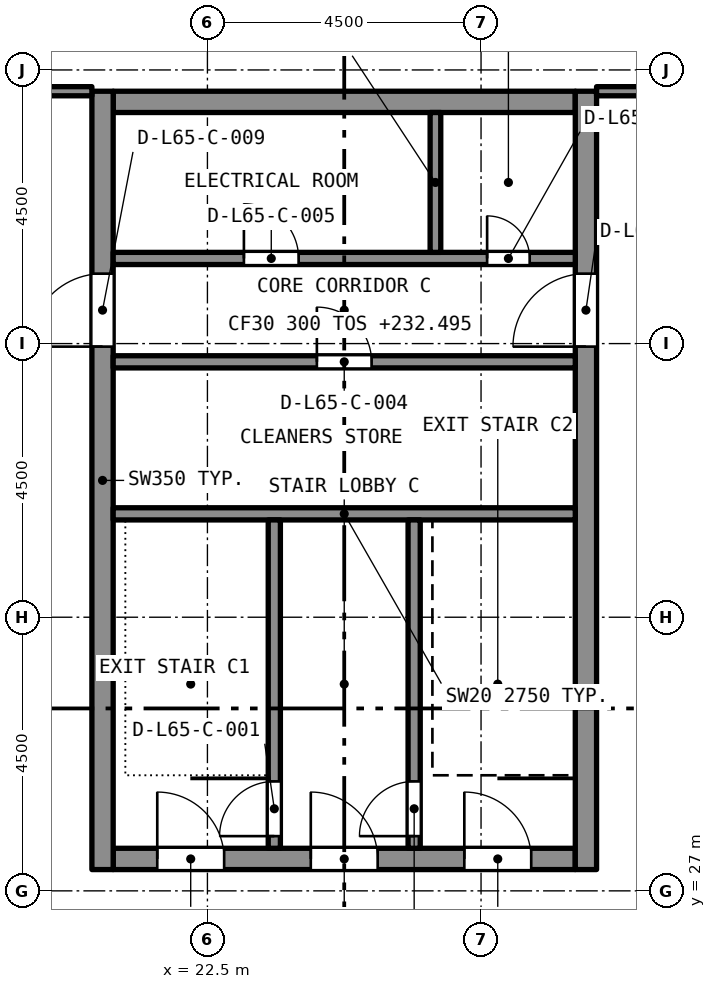
"""IFC4 building model, lengths in metres.
Left out: names, types, materials, properties, quantities, classifications, styles, units other than length and angle.
Written with IfcOpenShell. Run it as: python <this file> out.ifc"""

import sys

from ifc_helpers import new_model, si_unit, direction, frame, frame_2d, origin, place, context, subcontext, project, spatial, rectangle, extrude, element, fill, save


model = new_model("IFC4")
c1 = context("Model", 3, precision=1e-05, world=origin(), true_north=direction((0.0, 1.0)))
c2 = subcontext(c1, "Body", "Model", "MODEL_VIEW")
j1 = project(units=[si_unit("LENGTHUNIT", "METRE"), si_unit("PLANEANGLEUNIT", "RADIAN")], contexts=[c1])
p1 = place(None, origin())
s1 = spatial("IfcSite", under=j1, at=p1, CompositionType="ELEMENT")
p2 = place(p1, origin())
s2 = spatial("IfcBuilding", under=s1, at=p2, CompositionType="ELEMENT")
p3 = place(p2, frame((0.0, 0.0, 232.495)))
s3 = spatial("IfcBuildingStorey", under=s2, at=p3, CompositionType="ELEMENT", Elevation=232.495)
p4 = place(p3, frame((20.95, 27.525, 0.0), z_axis=(0.0, 0.0, 1.0), x_axis=(1.0, 0.0, 0.0)))
e1 = element("IfcWall", 1, at=p4, inside=s3, PredefinedType="SOLIDWALL", context=c2, shape_type="SweptSolid", body=[
    extrude(rectangle(XDim=7.6, YDim=0.35, at=frame_2d((3.8, 0.0))), origin(), (0.0, 0.0, 1.0), 3.2),
])
p5 = place(p4, frame((0.725, 0.0, 0.0)))
e2 = element("IfcOpeningElement", 2, at=p5, cuts=e1, PredefinedType="OPENING", context=c2, shape_type="SweptSolid", body=[
    extrude(rectangle(XDim=1.1, YDim=2.1, at=frame_2d((0.55, 1.05))), frame((0.0, 0.185, 0.0), z_axis=(0.0, -1.0, 0.0), x_axis=(1.0, 0.0, 0.0)), (0.0, 0.0, 1.0), 0.37),
])
p6 = place(p4, frame((3.25, 0.0, 0.0)))
e3 = element("IfcOpeningElement", 3, at=p6, cuts=e1, PredefinedType="OPENING", context=c2, shape_type="SweptSolid", body=[
    extrude(rectangle(XDim=1.1, YDim=2.1, at=frame_2d((0.55, 1.05))), frame((0.0, 0.185, 0.0), z_axis=(0.0, -1.0, 0.0), x_axis=(1.0, 0.0, 0.0)), (0.0, 0.0, 1.0), 0.37),
])
p7 = place(p4, frame((5.775, 0.0, 0.0)))
e4 = element("IfcOpeningElement", 4, at=p7, cuts=e1, PredefinedType="OPENING", context=c2, shape_type="SweptSolid", body=[
    extrude(rectangle(XDim=1.1, YDim=2.1, at=frame_2d((0.55, 1.05))), frame((0.0, 0.185, 0.0), z_axis=(0.0, -1.0, 0.0), x_axis=(1.0, 0.0, 0.0)), (0.0, 0.0, 1.0), 0.37),
])
p8 = place(p3, frame((20.95, 39.975, 0.0), z_axis=(0.0, 0.0, 1.0), x_axis=(1.0, 0.0, 0.0)))
e5 = element("IfcWall", 5, at=p8, inside=s3, PredefinedType="SOLIDWALL", context=c2, shape_type="SweptSolid", body=[
    extrude(rectangle(XDim=7.6, YDim=0.35, at=frame_2d((3.8, 0.0))), origin(), (0.0, 0.0, 1.0), 3.2),
])
p9 = place(p3, frame((20.775, 27.35, 0.0), z_axis=(0.0, 0.0, 1.0), x_axis=(0.0, 1.0, 0.0)))
e6 = element("IfcWall", 6, at=p9, inside=s3, PredefinedType="SOLIDWALL", context=c2, shape_type="SweptSolid", body=[
    extrude(rectangle(XDim=12.8, YDim=0.35, at=frame_2d((6.4, 0.0))), origin(), (0.0, 0.0, 1.0), 3.2),
])
p10 = place(p9, frame((8.6, 0.0, 0.0)))
e7 = element("IfcOpeningElement", 7, at=p10, cuts=e6, PredefinedType="OPENING", context=c2, shape_type="SweptSolid", body=[
    extrude(rectangle(XDim=1.2, YDim=2.1, at=frame_2d((0.6, 1.05))), frame((0.0, 0.185, 0.0), z_axis=(0.0, -1.0, 0.0), x_axis=(1.0, 0.0, 0.0)), (0.0, 0.0, 1.0), 0.37),
])
p11 = place(p3, frame((28.725, 27.35, 0.0), z_axis=(0.0, 0.0, 1.0), x_axis=(0.0, 1.0, 0.0)))
e8 = element("IfcWall", 8, at=p11, inside=s3, PredefinedType="SOLIDWALL", context=c2, shape_type="SweptSolid", body=[
    extrude(rectangle(XDim=12.8, YDim=0.35, at=frame_2d((6.4, 0.0))), origin(), (0.0, 0.0, 1.0), 3.2),
])
p12 = place(p11, frame((8.6, 0.0, 0.0)))
e9 = element("IfcOpeningElement", 9, at=p12, cuts=e8, PredefinedType="OPENING", context=c2, shape_type="SweptSolid", body=[
    extrude(rectangle(XDim=1.2, YDim=2.1, at=frame_2d((0.6, 1.05))), frame((0.0, 0.185, 0.0), z_axis=(0.0, -1.0, 0.0), x_axis=(1.0, 0.0, 0.0)), (0.0, 0.0, 1.0), 0.37),
])
p13 = place(p3, frame((18.4, 40.15, 0.0), z_axis=(0.0, 0.0, 1.0), x_axis=(1.0, 0.0, 0.0)))
e10 = element("IfcWall", 10, at=p13, inside=s3, PredefinedType="PARTITIONING", context=c2, shape_type="SweptSolid", body=[
    extrude(rectangle(XDim=2.2, YDim=0.15, at=frame_2d((1.1, 0.0))), origin(), (0.0, 0.0, 1.0), 2.75),
])
p14 = place(p13, frame((0.2, 0.0, 0.0)))
e11 = element("IfcOpeningElement", 11, at=p14, cuts=e10, PredefinedType="OPENING", context=c2, shape_type="SweptSolid", body=[
    extrude(rectangle(XDim=1.0, YDim=2.1, at=frame_2d((0.5, 1.05))), frame((0.0, 0.085, 0.0), z_axis=(0.0, -1.0, 0.0), x_axis=(1.0, 0.0, 0.0)), (0.0, 0.0, 1.0), 0.17),
])
p15 = place(p3, frame((28.9, 40.15, 0.0), z_axis=(0.0, 0.0, 1.0), x_axis=(1.0, 0.0, 0.0)))
e12 = element("IfcWall", 12, at=p15, inside=s3, PredefinedType="PARTITIONING", context=c2, shape_type="SweptSolid", body=[
    extrude(rectangle(XDim=2.2, YDim=0.15, at=frame_2d((1.1, 0.0))), origin(), (0.0, 0.0, 1.0), 2.75),
])
p16 = place(p3, frame((20.95, 33.2, 0.0), z_axis=(0.0, 0.0, 1.0), x_axis=(1.0, 0.0, 0.0)))
e13 = element("IfcWall", 13, at=p16, inside=s3, PredefinedType="SOLIDWALL", context=c2, shape_type="SweptSolid", body=[
    extrude(rectangle(XDim=7.6, YDim=0.2, at=frame_2d((3.8, 0.0))), origin(), (0.0, 0.0, 1.0), 2.75),
])
p17 = place(p3, frame((20.95, 35.7, 0.0), z_axis=(0.0, 0.0, 1.0), x_axis=(1.0, 0.0, 0.0)))
e14 = element("IfcWall", 14, at=p17, inside=s3, PredefinedType="SOLIDWALL", context=c2, shape_type="SweptSolid", body=[
    extrude(rectangle(XDim=7.6, YDim=0.2, at=frame_2d((3.8, 0.0))), origin(), (0.0, 0.0, 1.0), 2.75),
])
p18 = place(p17, frame((3.35, 0.0, 0.0)))
e15 = element("IfcOpeningElement", 15, at=p18, cuts=e14, PredefinedType="OPENING", context=c2, shape_type="SweptSolid", body=[
    extrude(rectangle(XDim=0.9, YDim=2.1, at=frame_2d((0.45, 1.05))), frame((0.0, 0.11, 0.0), z_axis=(0.0, -1.0, 0.0), x_axis=(1.0, 0.0, 0.0)), (0.0, 0.0, 1.0), 0.22),
])
p19 = place(p3, frame((20.95, 37.4, 0.0), z_axis=(0.0, 0.0, 1.0), x_axis=(1.0, 0.0, 0.0)))
e16 = element("IfcWall", 16, at=p19, inside=s3, PredefinedType="SOLIDWALL", context=c2, shape_type="SweptSolid", body=[
    extrude(rectangle(XDim=7.6, YDim=0.2, at=frame_2d((3.8, 0.0))), origin(), (0.0, 0.0, 1.0), 2.75),
])
p20 = place(p19, frame((6.15, 0.0, 0.0)))
e17 = element("IfcOpeningElement", 17, at=p20, cuts=e16, PredefinedType="OPENING", context=c2, shape_type="SweptSolid", body=[
    extrude(rectangle(XDim=0.7, YDim=2.1, at=frame_2d((0.35, 1.05))), frame((0.0, 0.11, 0.0), z_axis=(0.0, -1.0, 0.0), x_axis=(1.0, 0.0, 0.0)), (0.0, 0.0, 1.0), 0.22),
])
p21 = place(p19, frame((2.15, 0.0, 0.0)))
e18 = element("IfcOpeningElement", 18, at=p21, cuts=e16, PredefinedType="OPENING", context=c2, shape_type="SweptSolid", body=[
    extrude(rectangle(XDim=0.9, YDim=2.1, at=frame_2d((0.45, 1.05))), frame((0.0, 0.11, 0.0), z_axis=(0.0, -1.0, 0.0), x_axis=(1.0, 0.0, 0.0)), (0.0, 0.0, 1.0), 0.22),
])
p22 = place(p3, frame((23.6, 27.7, 0.0), z_axis=(0.0, 0.0, 1.0), x_axis=(0.0, 1.0, 0.0)))
e19 = element("IfcWall", 19, at=p22, inside=s3, PredefinedType="SOLIDWALL", context=c2, shape_type="SweptSolid", body=[
    extrude(rectangle(XDim=5.4, YDim=0.2, at=frame_2d((2.7, 0.0))), origin(), (0.0, 0.0, 1.0), 2.75),
])
p23 = place(p22, frame((0.2, 0.0, 0.0)))
e20 = element("IfcOpeningElement", 20, at=p23, cuts=e19, PredefinedType="OPENING", context=c2, shape_type="SweptSolid", body=[
    extrude(rectangle(XDim=0.9, YDim=2.1, at=frame_2d((0.45, 1.05))), frame((0.0, 0.11, 0.0), z_axis=(0.0, -1.0, 0.0), x_axis=(1.0, 0.0, 0.0)), (0.0, 0.0, 1.0), 0.22),
])
p24 = place(p3, frame((25.9, 27.7, 0.0), z_axis=(0.0, 0.0, 1.0), x_axis=(0.0, 1.0, 0.0)))
e21 = element("IfcWall", 21, at=p24, inside=s3, PredefinedType="SOLIDWALL", context=c2, shape_type="SweptSolid", body=[
    extrude(rectangle(XDim=5.4, YDim=0.2, at=frame_2d((2.7, 0.0))), origin(), (0.0, 0.0, 1.0), 2.75),
])
p25 = place(p24, frame((0.2, 0.0, 0.0)))
e22 = element("IfcOpeningElement", 22, at=p25, cuts=e21, PredefinedType="OPENING", context=c2, shape_type="SweptSolid", body=[
    extrude(rectangle(XDim=0.9, YDim=2.1, at=frame_2d((0.45, 1.05))), frame((0.0, 0.11, 0.0), z_axis=(0.0, -1.0, 0.0), x_axis=(1.0, 0.0, 0.0)), (0.0, 0.0, 1.0), 0.22),
])
p26 = place(p3, frame((26.25, 37.5, 0.0), z_axis=(0.0, 0.0, 1.0), x_axis=(0.0, 1.0, 0.0)))
e23 = element("IfcWall", 23, at=p26, inside=s3, PredefinedType="SOLIDWALL", context=c2, shape_type="SweptSolid", body=[
    extrude(rectangle(XDim=2.3, YDim=0.175, at=frame_2d((1.15, 0.0))), origin(), (0.0, 0.0, 1.0), 2.75),
])
p27 = place(p23, origin())
e24 = element("IfcDoor", 24, at=p27, inside=s3, OperationType="SINGLE_SWING_LEFT", PredefinedType="DOOR", context=c2, shape_type="SweptSolid", body=[
    extrude(rectangle(XDim=0.9, YDim=2.1, at=frame_2d((0.45, 1.05))), frame((0.0, 0.025, 0.0), z_axis=(0.0, -1.0, 0.0), x_axis=(1.0, 0.0, 0.0)), (0.0, 0.0, 1.0), 0.05),
])
fill(e20, e24)
p28 = place(p25, origin())
e25 = element("IfcDoor", 25, at=p28, inside=s3, OperationType="SINGLE_SWING_LEFT", PredefinedType="DOOR", context=c2, shape_type="SweptSolid", body=[
    extrude(rectangle(XDim=0.9, YDim=2.1, at=frame_2d((0.45, 1.05))), frame((0.0, 0.025, 0.0), z_axis=(0.0, -1.0, 0.0), x_axis=(1.0, 0.0, 0.0)), (0.0, 0.0, 1.0), 0.05),
])
fill(e22, e25)
p29 = place(p20, origin())
e26 = element("IfcDoor", 26, at=p29, inside=s3, OperationType="SINGLE_SWING_LEFT", PredefinedType="DOOR", context=c2, shape_type="SweptSolid", body=[
    extrude(rectangle(XDim=0.7, YDim=2.1, at=frame_2d((0.35, 1.05))), frame((0.0, 0.025, 0.0), z_axis=(0.0, -1.0, 0.0), x_axis=(1.0, 0.0, 0.0)), (0.0, 0.0, 1.0), 0.05),
])
fill(e17, e26)
p30 = place(p18, origin())
e27 = element("IfcDoor", 27, at=p30, inside=s3, OperationType="SINGLE_SWING_LEFT", PredefinedType="DOOR", context=c2, shape_type="SweptSolid", body=[
    extrude(rectangle(XDim=0.9, YDim=2.1, at=frame_2d((0.45, 1.05))), frame((0.0, 0.025, 0.0), z_axis=(0.0, -1.0, 0.0), x_axis=(1.0, 0.0, 0.0)), (0.0, 0.0, 1.0), 0.05),
])
fill(e15, e27)
p31 = place(p21, origin())
e28 = element("IfcDoor", 28, at=p31, inside=s3, OperationType="SINGLE_SWING_LEFT", PredefinedType="DOOR", context=c2, shape_type="SweptSolid", body=[
    extrude(rectangle(XDim=0.9, YDim=2.1, at=frame_2d((0.45, 1.05))), frame((0.0, 0.025, 0.0), z_axis=(0.0, -1.0, 0.0), x_axis=(1.0, 0.0, 0.0)), (0.0, 0.0, 1.0), 0.05),
])
fill(e18, e28)
p32 = place(p5, origin())
e29 = element("IfcDoor", 29, at=p32, inside=s3, OperationType="SINGLE_SWING_LEFT", PredefinedType="DOOR", context=c2, shape_type="SweptSolid", body=[
    extrude(rectangle(XDim=1.1, YDim=2.1, at=frame_2d((0.55, 1.05))), frame((0.0, 0.025, 0.0), z_axis=(0.0, -1.0, 0.0), x_axis=(1.0, 0.0, 0.0)), (0.0, 0.0, 1.0), 0.05),
])
fill(e2, e29)
p33 = place(p6, origin())
e30 = element("IfcDoor", 30, at=p33, inside=s3, OperationType="SINGLE_SWING_LEFT", PredefinedType="DOOR", context=c2, shape_type="SweptSolid", body=[
    extrude(rectangle(XDim=1.1, YDim=2.1, at=frame_2d((0.55, 1.05))), frame((0.0, 0.025, 0.0), z_axis=(0.0, -1.0, 0.0), x_axis=(1.0, 0.0, 0.0)), (0.0, 0.0, 1.0), 0.05),
])
fill(e3, e30)
p34 = place(p7, origin())
e31 = element("IfcDoor", 31, at=p34, inside=s3, OperationType="SINGLE_SWING_LEFT", PredefinedType="DOOR", context=c2, shape_type="SweptSolid", body=[
    extrude(rectangle(XDim=1.1, YDim=2.1, at=frame_2d((0.55, 1.05))), frame((0.0, 0.025, 0.0), z_axis=(0.0, -1.0, 0.0), x_axis=(1.0, 0.0, 0.0)), (0.0, 0.0, 1.0), 0.05),
])
fill(e4, e31)
p35 = place(p10, origin())
e32 = element("IfcDoor", 32, at=p35, inside=s3, OperationType="SINGLE_SWING_LEFT", PredefinedType="DOOR", context=c2, shape_type="SweptSolid", body=[
    extrude(rectangle(XDim=1.2, YDim=2.1, at=frame_2d((0.6, 1.05))), frame((0.0, 0.025, 0.0), z_axis=(0.0, -1.0, 0.0), x_axis=(1.0, 0.0, 0.0)), (0.0, 0.0, 1.0), 0.05),
])
fill(e7, e32)
p36 = place(p12, origin())
e33 = element("IfcDoor", 33, at=p36, inside=s3, OperationType="SINGLE_SWING_LEFT", PredefinedType="DOOR", context=c2, shape_type="SweptSolid", body=[
    extrude(rectangle(XDim=1.2, YDim=2.1, at=frame_2d((0.6, 1.05))), frame((0.0, 0.025, 0.0), z_axis=(0.0, -1.0, 0.0), x_axis=(1.0, 0.0, 0.0)), (0.0, 0.0, 1.0), 0.05),
])
fill(e9, e33)
save(model, sys.argv[1])
